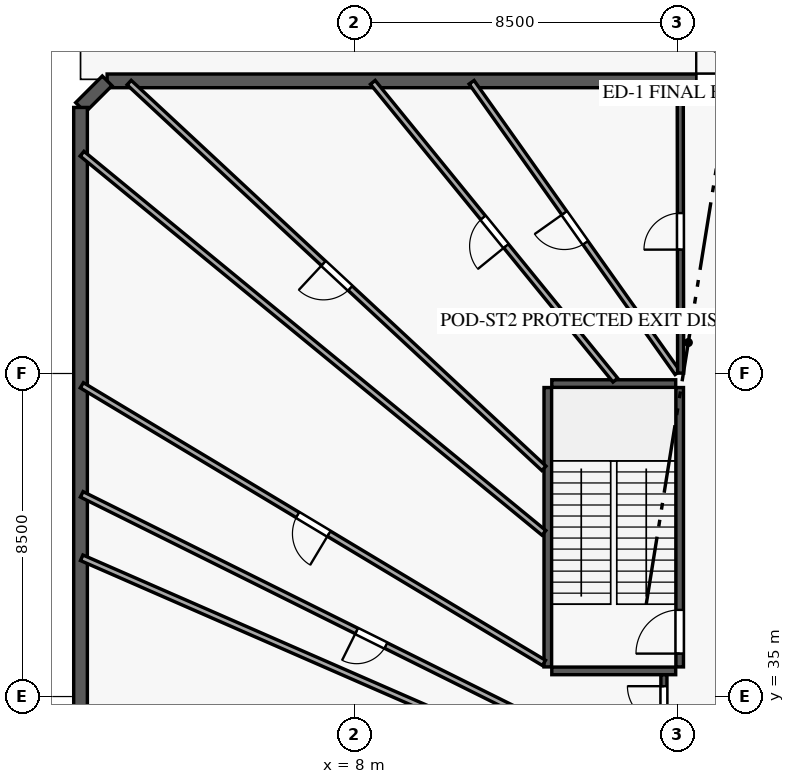
"""IFC4 building model, lengths in metres.
Left out: names, types, materials, properties, quantities, classifications, styles, units other than length and angle.
Written with IfcOpenShell. Run it as: python <this file> out.ifc"""

import sys

from ifc_helpers import new_model, si_unit, direction, frame, frame_2d, origin, origin_with_axes, origin_2d, place, context, subcontext, project, spatial, rectangle, circle, extrude, source, transform, mapped, element, fill, save


model = new_model("IFC4")
c1 = context("Model", 3, precision=1e-05, world=origin(), true_north=direction((0.0, 1.0)))
c2 = subcontext(c1, "Body", "Model", "MODEL_VIEW")
j1 = project(units=[si_unit("LENGTHUNIT", "METRE"), si_unit("PLANEANGLEUNIT", "RADIAN")], contexts=[c1])
p1 = place(None, origin())
s1 = spatial("IfcSite", under=j1, at=p1, CompositionType="ELEMENT")
p2 = place(p1, origin())
s2 = spatial("IfcBuilding", under=s1, at=p2, CompositionType="ELEMENT")
p3 = place(p2, origin())
s3 = spatial("IfcBuildingStorey", under=s2, at=p3, CompositionType="ELEMENT", Elevation=0.0)
m1 = source(origin_with_axes(), c2, "Body", "SweptSolid", [
    extrude(circle(Radius=0.9, at=origin_2d()), origin(), (0.0, 0.0, 1.0), 4.5),
])
p4 = place(p3, frame((10.2, 45.5, 0.0), z_axis=(0.0, 0.0, 1.0), x_axis=(1.0, 0.0, 0.0)))
e1 = element("IfcColumn", 1, at=p4, inside=s3, PredefinedType="COLUMN", context=c2, shape_type="MappedRepresentation", body=[
    mapped(m1, transform((0.0, 0.0, 0.0), scale=1.0)),
])
p5 = place(p3, frame((1.5, 51.2, 0.0), z_axis=(0.0, 0.0, 1.0), x_axis=(1.0, 0.0, 0.0)))
e2 = element("IfcWall", 2, at=p5, inside=s3, PredefinedType="SOLIDWALL", context=c2, shape_type="SweptSolid", body=[
    extrude(rectangle(XDim=54.6, YDim=0.36, at=frame_2d((27.3, 0.0))), origin(), (0.0, 0.0, 1.0), 4.2),
])
p6 = place(p5, frame((51.007, 0.0, 0.85)))
e3 = element("IfcOpeningElement", 3, at=p6, cuts=e2, PredefinedType="OPENING", context=c2, shape_type="SweptSolid", body=[
    extrude(rectangle(XDim=1.8, YDim=2.2, at=frame_2d((0.9, 1.1))), frame((0.0, 0.19, 0.0), z_axis=(0.0, -1.0, 0.0), x_axis=(1.0, 0.0, 0.0)), (0.0, 0.0, 1.0), 0.38),
])
p7 = place(p5, frame((46.765, 0.0, 0.85)))
e4 = element("IfcOpeningElement", 4, at=p7, cuts=e2, PredefinedType="OPENING", context=c2, shape_type="SweptSolid", body=[
    extrude(rectangle(XDim=1.8, YDim=2.2, at=frame_2d((0.9, 1.1))), frame((0.0, 0.19, 0.0), z_axis=(0.0, -1.0, 0.0), x_axis=(1.0, 0.0, 0.0)), (0.0, 0.0, 1.0), 0.38),
])
p8 = place(p5, frame((41.844, 0.0, 0.85)))
e5 = element("IfcOpeningElement", 5, at=p8, cuts=e2, PredefinedType="OPENING", context=c2, shape_type="SweptSolid", body=[
    extrude(rectangle(XDim=1.8, YDim=2.2, at=frame_2d((0.9, 1.1))), frame((0.0, 0.19, 0.0), z_axis=(0.0, -1.0, 0.0), x_axis=(1.0, 0.0, 0.0)), (0.0, 0.0, 1.0), 0.38),
])
p9 = place(p5, frame((36.894, 0.0, 0.85)))
e6 = element("IfcOpeningElement", 6, at=p9, cuts=e2, PredefinedType="OPENING", context=c2, shape_type="SweptSolid", body=[
    extrude(rectangle(XDim=1.8, YDim=2.2, at=frame_2d((0.9, 1.1))), frame((0.0, 0.19, 0.0), z_axis=(0.0, -1.0, 0.0), x_axis=(1.0, 0.0, 0.0)), (0.0, 0.0, 1.0), 0.38),
])
p10 = place(p5, frame((29.542, 0.0, 0.85)))
e7 = element("IfcOpeningElement", 7, at=p10, cuts=e2, PredefinedType="OPENING", context=c2, shape_type="SweptSolid", body=[
    extrude(rectangle(XDim=1.8, YDim=2.2, at=frame_2d((0.9, 1.1))), frame((0.0, 0.19, 0.0), z_axis=(0.0, -1.0, 0.0), x_axis=(1.0, 0.0, 0.0)), (0.0, 0.0, 1.0), 0.38),
])
p11 = place(p5, frame((25.094, 0.0, 0.85)))
e8 = element("IfcOpeningElement", 8, at=p11, cuts=e2, PredefinedType="OPENING", context=c2, shape_type="SweptSolid", body=[
    extrude(rectangle(XDim=1.8, YDim=2.2, at=frame_2d((0.9, 1.1))), frame((0.0, 0.19, 0.0), z_axis=(0.0, -1.0, 0.0), x_axis=(1.0, 0.0, 0.0)), (0.0, 0.0, 1.0), 0.38),
])
p12 = place(p5, frame((11.445, 0.0, 0.85)))
e9 = element("IfcOpeningElement", 9, at=p12, cuts=e2, PredefinedType="OPENING", context=c2, shape_type="SweptSolid", body=[
    extrude(rectangle(XDim=1.8, YDim=2.2, at=frame_2d((0.9, 1.1))), frame((0.0, 0.19, 0.0), z_axis=(0.0, -1.0, 0.0), x_axis=(1.0, 0.0, 0.0)), (0.0, 0.0, 1.0), 0.38),
])
p13 = place(p5, frame((2.908, 0.0, 0.85)))
e10 = element("IfcOpeningElement", 10, at=p13, cuts=e2, PredefinedType="OPENING", context=c2, shape_type="SweptSolid", body=[
    extrude(rectangle(XDim=1.8, YDim=2.2, at=frame_2d((0.9, 1.1))), frame((0.0, 0.19, 0.0), z_axis=(0.0, -1.0, 0.0), x_axis=(1.0, 0.0, 0.0)), (0.0, 0.0, 1.0), 0.38),
])
p14 = place(p5, frame((19.6, 0.0, 0.0)))
e11 = element("IfcOpeningElement", 11, at=p14, cuts=e2, PredefinedType="OPENING", context=c2, shape_type="SweptSolid", body=[
    extrude(rectangle(XDim=1.8, YDim=2.3, at=frame_2d((0.9, 1.15))), frame((0.0, 0.19, 0.0), z_axis=(0.0, -1.0, 0.0), x_axis=(1.0, 0.0, 0.0)), (0.0, 0.0, 1.0), 0.38),
])
p15 = place(p5, frame((22.2, 0.0, 0.0)))
e12 = element("IfcOpeningElement", 12, at=p15, cuts=e2, PredefinedType="OPENING", context=c2, shape_type="SweptSolid", body=[
    extrude(rectangle(XDim=1.8, YDim=2.3, at=frame_2d((0.9, 1.15))), frame((0.0, 0.19, 0.0), z_axis=(0.0, -1.0, 0.0), x_axis=(1.0, 0.0, 0.0)), (0.0, 0.0, 1.0), 0.38),
])
p16 = place(p5, frame((15.5, 0.0, 0.0)))
e13 = element("IfcOpeningElement", 13, at=p16, cuts=e2, PredefinedType="OPENING", context=c2, shape_type="SweptSolid", body=[
    extrude(rectangle(XDim=1.8, YDim=2.3, at=frame_2d((0.9, 1.15))), frame((0.0, 0.19, 0.0), z_axis=(0.0, -1.0, 0.0), x_axis=(1.0, 0.0, 0.0)), (0.0, 0.0, 1.0), 0.38),
])
p17 = place(p3, frame((1.5, 51.2, 0.0), z_axis=(0.0, 0.0, 1.0), x_axis=(-0.707106781187, -0.707106781187, 0.0)))
e14 = element("IfcWall", 14, at=p17, inside=s3, PredefinedType="SOLIDWALL", context=c2, shape_type="SweptSolid", body=[
    extrude(rectangle(XDim=0.99, YDim=0.36, at=frame_2d((0.495, 0.0))), origin(), (0.0, 0.0, 1.0), 4.2),
])
p18 = place(p3, frame((0.8, 2.5, 0.0), z_axis=(0.0, 0.0, 1.0), x_axis=(0.0, 1.0, 0.0)))
e15 = element("IfcWall", 15, at=p18, inside=s3, PredefinedType="SOLIDWALL", context=c2, shape_type="SweptSolid", body=[
    extrude(rectangle(XDim=48.0, YDim=0.36, at=frame_2d((24.0, 0.0))), origin(), (0.0, 0.0, 1.0), 4.2),
])
p19 = place(p18, frame((42.816, 0.0, 0.85)))
e16 = element("IfcOpeningElement", 16, at=p19, cuts=e15, PredefinedType="OPENING", context=c2, shape_type="SweptSolid", body=[
    extrude(rectangle(XDim=1.8, YDim=2.2, at=frame_2d((0.9, 1.1))), frame((0.0, 0.19, 0.0), z_axis=(0.0, -1.0, 0.0), x_axis=(1.0, 0.0, 0.0)), (0.0, 0.0, 1.0), 0.38),
])
p20 = place(p18, frame((38.338, 0.0, 0.85)))
e17 = element("IfcOpeningElement", 17, at=p20, cuts=e15, PredefinedType="OPENING", context=c2, shape_type="SweptSolid", body=[
    extrude(rectangle(XDim=1.8, YDim=2.2, at=frame_2d((0.9, 1.1))), frame((0.0, 0.19, 0.0), z_axis=(0.0, -1.0, 0.0), x_axis=(1.0, 0.0, 0.0)), (0.0, 0.0, 1.0), 0.38),
])
p21 = place(p18, frame((33.194, 0.0, 0.85)))
e18 = element("IfcOpeningElement", 18, at=p21, cuts=e15, PredefinedType="OPENING", context=c2, shape_type="SweptSolid", body=[
    extrude(rectangle(XDim=1.8, YDim=2.2, at=frame_2d((0.9, 1.1))), frame((0.0, 0.19, 0.0), z_axis=(0.0, -1.0, 0.0), x_axis=(1.0, 0.0, 0.0)), (0.0, 0.0, 1.0), 0.38),
])
p22 = place(p18, frame((29.492, 0.0, 0.85)))
e19 = element("IfcOpeningElement", 19, at=p22, cuts=e15, PredefinedType="OPENING", context=c2, shape_type="SweptSolid", body=[
    extrude(rectangle(XDim=1.8, YDim=2.2, at=frame_2d((0.9, 1.1))), frame((0.0, 0.19, 0.0), z_axis=(0.0, -1.0, 0.0), x_axis=(1.0, 0.0, 0.0)), (0.0, 0.0, 1.0), 0.38),
])
p23 = place(p18, frame((24.971, 0.0, 0.85)))
e20 = element("IfcOpeningElement", 20, at=p23, cuts=e15, PredefinedType="OPENING", context=c2, shape_type="SweptSolid", body=[
    extrude(rectangle(XDim=1.8, YDim=2.2, at=frame_2d((0.9, 1.1))), frame((0.0, 0.19, 0.0), z_axis=(0.0, -1.0, 0.0), x_axis=(1.0, 0.0, 0.0)), (0.0, 0.0, 1.0), 0.38),
])
p24 = place(p18, frame((12.315, 0.0, 0.85)))
e21 = element("IfcOpeningElement", 21, at=p24, cuts=e15, PredefinedType="OPENING", context=c2, shape_type="SweptSolid", body=[
    extrude(rectangle(XDim=1.8, YDim=2.2, at=frame_2d((0.9, 1.1))), frame((0.0, 0.19, 0.0), z_axis=(0.0, -1.0, 0.0), x_axis=(1.0, 0.0, 0.0)), (0.0, 0.0, 1.0), 0.38),
])
p25 = place(p18, frame((6.841, 0.0, 0.85)))
e22 = element("IfcOpeningElement", 22, at=p25, cuts=e15, PredefinedType="OPENING", context=c2, shape_type="SweptSolid", body=[
    extrude(rectangle(XDim=1.8, YDim=2.2, at=frame_2d((0.9, 1.1))), frame((0.0, 0.19, 0.0), z_axis=(0.0, -1.0, 0.0), x_axis=(1.0, 0.0, 0.0)), (0.0, 0.0, 1.0), 0.38),
])
p26 = place(p18, frame((3.189, 0.0, 0.85)))
e23 = element("IfcOpeningElement", 23, at=p26, cuts=e15, PredefinedType="OPENING", context=c2, shape_type="SweptSolid", body=[
    extrude(rectangle(XDim=1.8, YDim=2.2, at=frame_2d((0.9, 1.1))), frame((0.0, 0.19, 0.0), z_axis=(0.0, -1.0, 0.0), x_axis=(1.0, 0.0, 0.0)), (0.0, 0.0, 1.0), 0.38),
])
p27 = place(p18, frame((17.2, 0.0, 0.0)))
e24 = element("IfcOpeningElement", 24, at=p27, cuts=e15, PredefinedType="OPENING", context=c2, shape_type="SweptSolid", body=[
    extrude(rectangle(XDim=1.8, YDim=2.3, at=frame_2d((0.9, 1.15))), frame((0.0, 0.19, 0.0), z_axis=(0.0, -1.0, 0.0), x_axis=(1.0, 0.0, 0.0)), (0.0, 0.0, 1.0), 0.38),
])
p28 = place(p3, frame((13.095, 35.78, 0.0), z_axis=(0.0, 0.0, 1.0), x_axis=(0.0, 1.0, 0.0)))
e25 = element("IfcWall", 25, at=p28, inside=s3, PredefinedType="SHEAR", context=c2, shape_type="SweptSolid", body=[
    extrude(rectangle(XDim=7.35, YDim=0.2, at=frame_2d((3.675, 0.0))), origin(), (0.0, 0.0, 1.0), 4.2),
])
p29 = place(p3, frame((16.565, 35.78, 0.0), z_axis=(0.0, 0.0, 1.0), x_axis=(0.0, 1.0, 0.0)))
e26 = element("IfcWall", 26, at=p29, inside=s3, PredefinedType="SHEAR", context=c2, shape_type="SweptSolid", body=[
    extrude(rectangle(XDim=7.35, YDim=0.2, at=frame_2d((3.675, 0.0))), origin(), (0.0, 0.0, 1.0), 4.2),
])
p30 = place(p29, frame((0.35, 0.0, 0.0)))
e27 = element("IfcOpeningElement", 27, at=p30, cuts=e26, PredefinedType="OPENING", context=c2, shape_type="SweptSolid", body=[
    extrude(rectangle(XDim=1.15, YDim=2.15, at=frame_2d((0.575, 1.075))), frame((0.0, 0.11, 0.0), z_axis=(0.0, -1.0, 0.0), x_axis=(1.0, 0.0, 0.0)), (0.0, 0.0, 1.0), 0.22),
])
for number, where, z_axis, x_axis in (
    (28, (13.2, 35.675, 0.0), (0.0, 0.0, 1.0), (1.0, 0.0, 0.0)),
    (29, (13.2, 43.235, 0.0), (0.0, 0.0, 1.0), (1.0, 0.0, 0.0)),
):
    element("IfcWall", number, at=place(p3, frame(where, z_axis=z_axis, x_axis=x_axis)), inside=s3, PredefinedType="SHEAR", context=c2, shape_type="SweptSolid", body=[
        extrude(rectangle(XDim=3.26, YDim=0.2, at=frame_2d((1.63, 0.0))), origin(), (0.0, 0.0, 1.0), 4.2),
    ])
p31 = place(p3, frame((16.068, 32.747, 0.0), z_axis=(0.0, 0.0, 1.0), x_axis=(-0.895480769827, 0.44510020318, 0.0)))
e30 = element("IfcWall", 30, at=p31, inside=s3, PredefinedType="PARTITIONING", context=c2, shape_type="SweptSolid", body=[
    extrude(rectangle(XDim=17.015, YDim=0.16, at=frame_2d((8.507, 0.0))), origin(), (0.0, 0.0, 1.0), 4.2),
])
p32 = place(p31, frame((8.077, 0.0, 0.0)))
e31 = element("IfcOpeningElement", 31, at=p32, cuts=e30, PredefinedType="OPENING", context=c2, shape_type="SweptSolid", body=[
    extrude(rectangle(XDim=0.86, YDim=2.04, at=frame_2d((0.43, 1.02))), frame((0.0, 0.09, 0.0), z_axis=(0.0, -1.0, 0.0), x_axis=(1.0, 0.0, 0.0)), (0.0, 0.0, 1.0), 0.18),
])
p33 = place(p3, frame((16.068, 31.996, 0.0), z_axis=(0.0, 0.0, 1.0), x_axis=(-0.916400464202, 0.400262650281, 0.0)))
e32 = element("IfcWall", 32, at=p33, inside=s3, PredefinedType="PARTITIONING", context=c2, shape_type="SweptSolid", body=[
    extrude(rectangle(XDim=16.628, YDim=0.16, at=frame_2d((8.314, 0.0))), origin(), (0.0, 0.0, 1.0), 4.2),
])
p34 = place(p3, frame((12.993, 39.307, 0.0), z_axis=(0.0, 0.0, 1.0), x_axis=(-0.772944890545, 0.634473164272, 0.0)))
e33 = element("IfcWall", 33, at=p34, inside=s3, PredefinedType="PARTITIONING", context=c2, shape_type="SweptSolid", body=[
    extrude(rectangle(XDim=15.723, YDim=0.16, at=frame_2d((7.862, 0.0))), origin(), (0.0, 0.0, 1.0), 4.2),
])
p35 = place(p3, frame((12.993, 41.004, 0.0), z_axis=(0.0, 0.0, 1.0), x_axis=(-0.732268799171, 0.681015716236, 0.0)))
e34 = element("IfcWall", 34, at=p35, inside=s3, PredefinedType="PARTITIONING", context=c2, shape_type="SweptSolid", body=[
    extrude(rectangle(XDim=14.905, YDim=0.16, at=frame_2d((7.452, 0.0))), origin(), (0.0, 0.0, 1.0), 4.2),
])
p36 = place(p35, frame((6.96, 0.0, 0.0)))
e35 = element("IfcOpeningElement", 35, at=p36, cuts=e34, PredefinedType="OPENING", context=c2, shape_type="SweptSolid", body=[
    extrude(rectangle(XDim=0.96, YDim=2.15, at=frame_2d((0.48, 1.075))), frame((0.0, 0.09, 0.0), z_axis=(0.0, -1.0, 0.0), x_axis=(1.0, 0.0, 0.0)), (0.0, 0.0, 1.0), 0.18),
])
p37 = place(p3, frame((12.993, 35.885, 0.0), z_axis=(0.0, 0.0, 1.0), x_axis=(-0.857213350392, 0.514961427594, 0.0)))
e36 = element("IfcWall", 36, at=p37, inside=s3, PredefinedType="PARTITIONING", context=c2, shape_type="SweptSolid", body=[
    extrude(rectangle(XDim=14.184, YDim=0.16, at=frame_2d((7.092, 0.0))), origin(), (0.0, 0.0, 1.0), 4.2),
])
p38 = place(p37, frame((6.6, 0.0, 0.0)))
e37 = element("IfcOpeningElement", 37, at=p38, cuts=e36, PredefinedType="OPENING", context=c2, shape_type="SweptSolid", body=[
    extrude(rectangle(XDim=0.96, YDim=2.15, at=frame_2d((0.48, 1.075))), frame((0.0, 0.09, 0.0), z_axis=(0.0, -1.0, 0.0), x_axis=(1.0, 0.0, 0.0)), (0.0, 0.0, 1.0), 0.18),
])
p39 = place(p3, frame((14.872, 43.325, 0.0), z_axis=(0.0, 0.0, 1.0), x_axis=(-0.63154172537, 0.775341891759, 0.0)))
e38 = element("IfcWall", 38, at=p39, inside=s3, PredefinedType="PARTITIONING", context=c2, shape_type="SweptSolid", body=[
    extrude(rectangle(XDim=10.105, YDim=0.16, at=frame_2d((5.053, 0.0))), origin(), (0.0, 0.0, 1.0), 4.2),
])
p40 = place(p39, frame((4.552, 0.0, 0.0)))
e39 = element("IfcOpeningElement", 39, at=p40, cuts=e38, PredefinedType="OPENING", context=c2, shape_type="SweptSolid", body=[
    extrude(rectangle(XDim=0.96, YDim=2.15, at=frame_2d((0.48, 1.075))), frame((0.0, 0.09, 0.0), z_axis=(0.0, -1.0, 0.0), x_axis=(1.0, 0.0, 0.0)), (0.0, 0.0, 1.0), 0.18),
])
p41 = place(p3, frame((16.51, 43.518, 0.0), z_axis=(0.0, 0.0, 1.0), x_axis=(-0.578309317505, 0.815817585792, 0.0)))
e40 = element("IfcWall", 40, at=p41, inside=s3, PredefinedType="PARTITIONING", context=c2, shape_type="SweptSolid", body=[
    extrude(rectangle(XDim=9.372, YDim=0.16, at=frame_2d((4.686, 0.0))), origin(), (0.0, 0.0, 1.0), 4.2),
])
p42 = place(p41, frame((4.193, 0.0, 0.0)))
e41 = element("IfcOpeningElement", 41, at=p42, cuts=e40, PredefinedType="OPENING", context=c2, shape_type="SweptSolid", body=[
    extrude(rectangle(XDim=0.96, YDim=2.15, at=frame_2d((0.48, 1.075))), frame((0.0, 0.09, 0.0), z_axis=(0.0, -1.0, 0.0), x_axis=(1.0, 0.0, 0.0)), (0.0, 0.0, 1.0), 0.18),
])
p43 = place(p3, frame((16.59, 43.51, 0.0), z_axis=(0.0, 0.0, 1.0), x_axis=(-0.001297773224, 0.999999157892, 0.0)))
e42 = element("IfcWall", 42, at=p43, inside=s3, PredefinedType="PARTITIONING", context=c2, shape_type="SweptSolid", body=[
    extrude(rectangle(XDim=7.525, YDim=0.16, at=frame_2d((3.762, 0.0))), origin(), (0.0, 0.0, 1.0), 4.2),
])
p44 = place(p43, frame((3.25, 0.0, 0.0)))
e43 = element("IfcOpeningElement", 43, at=p44, cuts=e42, PredefinedType="OPENING", context=c2, shape_type="SweptSolid", body=[
    extrude(rectangle(XDim=0.96, YDim=2.15, at=frame_2d((0.48, 1.075))), frame((0.0, 0.09, 0.0), z_axis=(0.0, -1.0, 0.0), x_axis=(1.0, 0.0, 0.0)), (0.0, 0.0, 1.0), 0.18),
])
p45 = place(p3, frame((16.15, 29.712, 0.0), z_axis=(0.0, 0.0, 1.0), x_axis=(0.0, 1.0, 0.0)))
e44 = element("IfcWall", 44, at=p45, inside=s3, PredefinedType="PARTITIONING", context=c2, shape_type="SweptSolid", body=[
    extrude(rectangle(XDim=5.861, YDim=0.16, at=frame_2d((2.93, 0.0))), origin(), (0.0, 0.0, 1.0), 4.2),
])
p46 = place(p45, frame((3.459, 0.0, 0.0)))
e45 = element("IfcOpeningElement", 45, at=p46, cuts=e44, PredefinedType="OPENING", context=c2, shape_type="SweptSolid", body=[
    extrude(rectangle(XDim=0.96, YDim=2.15, at=frame_2d((0.48, 1.075))), frame((0.0, 0.09, 0.0), z_axis=(0.0, -1.0, 0.0), x_axis=(1.0, 0.0, 0.0)), (0.0, 0.0, 1.0), 0.18),
])
p47 = place(p45, frame((1.1, 0.0, 0.0)))
e46 = element("IfcOpeningElement", 46, at=p47, cuts=e44, PredefinedType="OPENING", context=c2, shape_type="SweptSolid", body=[
    extrude(rectangle(XDim=0.96, YDim=2.15, at=frame_2d((0.48, 1.075))), frame((0.0, 0.09, 0.0), z_axis=(0.0, -1.0, 0.0), x_axis=(1.0, 0.0, 0.0)), (0.0, 0.0, 1.0), 0.18),
])
p48 = place(p45, frame((4.601, 0.0, 0.0)))
e47 = element("IfcOpeningElement", 47, at=p48, cuts=e44, PredefinedType="OPENING", context=c2, shape_type="SweptSolid", body=[
    extrude(rectangle(XDim=0.96, YDim=2.15, at=frame_2d((0.48, 1.075))), frame((0.0, 0.09, 0.0), z_axis=(0.0, -1.0, 0.0), x_axis=(1.0, 0.0, 0.0)), (0.0, 0.0, 1.0), 0.18),
])
m2 = source(origin_with_axes(), c2, "Body", "SweptSolid", [
    extrude(rectangle(XDim=1.8, YDim=2.2, at=frame_2d((0.9, 1.1))), frame((0.0, 0.03, 0.0), z_axis=(0.0, -1.0, 0.0), x_axis=(1.0, 0.0, 0.0)), (0.0, 0.0, 1.0), 0.06),
])
p49 = place(p12, origin())
e48 = element("IfcWindow", 48, at=p49, inside=s3, PartitioningType="SINGLE_PANEL", PredefinedType="WINDOW", context=c2, shape_type="MappedRepresentation", body=[
    mapped(m2, transform((0.0, 0.0, 0.0), scale=1.0)),
])
fill(e9, e48)
p50 = place(p13, origin())
e49 = element("IfcWindow", 49, at=p50, inside=s3, PartitioningType="SINGLE_PANEL", PredefinedType="WINDOW", context=c2, shape_type="MappedRepresentation", body=[
    mapped(m2, transform((0.0, 0.0, 0.0), scale=1.0)),
])
fill(e10, e49)
p51 = place(p19, origin())
e50 = element("IfcWindow", 50, at=p51, inside=s3, PartitioningType="SINGLE_PANEL", PredefinedType="WINDOW", context=c2, shape_type="MappedRepresentation", body=[
    mapped(m2, transform((0.0, 0.0, 0.0), scale=1.0)),
])
fill(e16, e50)
p52 = place(p20, origin())
e51 = element("IfcWindow", 51, at=p52, inside=s3, PartitioningType="SINGLE_PANEL", PredefinedType="WINDOW", context=c2, shape_type="MappedRepresentation", body=[
    mapped(m2, transform((0.0, 0.0, 0.0), scale=1.0)),
])
fill(e17, e51)
p53 = place(p21, origin())
e52 = element("IfcWindow", 52, at=p53, inside=s3, PartitioningType="SINGLE_PANEL", PredefinedType="WINDOW", context=c2, shape_type="MappedRepresentation", body=[
    mapped(m2, transform((0.0, 0.0, 0.0), scale=1.0)),
])
fill(e18, e52)
m3 = source(origin_with_axes(), c2, "Body", "SweptSolid", [
    extrude(rectangle(XDim=1.8, YDim=2.3, at=frame_2d((0.9, 1.15))), frame((0.0, 0.025, 0.0), z_axis=(0.0, -1.0, 0.0), x_axis=(1.0, 0.0, 0.0)), (0.0, 0.0, 1.0), 0.05),
])
p54 = place(p16, origin())
e53 = element("IfcDoor", 53, at=p54, inside=s3, OperationType="DOUBLE_DOOR_SINGLE_SWING", PredefinedType="DOOR", context=c2, shape_type="MappedRepresentation", body=[
    mapped(m3, transform((0.0, 0.0, 0.0), scale=1.0)),
])
fill(e13, e53)
m4 = source(origin_with_axes(), c2, "Body", "SweptSolid", [
    extrude(rectangle(XDim=1.15, YDim=2.15, at=frame_2d((0.575, 1.075))), frame((0.0, 0.025, 0.0), z_axis=(0.0, -1.0, 0.0), x_axis=(1.0, 0.0, 0.0)), (0.0, 0.0, 1.0), 0.05),
])
p55 = place(p30, origin())
e54 = element("IfcDoor", 54, at=p55, inside=s3, OperationType="SINGLE_SWING_LEFT", PredefinedType="DOOR", context=c2, shape_type="MappedRepresentation", body=[
    mapped(m4, transform((0.0, 0.0, 0.0), scale=1.0)),
])
fill(e27, e54)
m5 = source(origin_with_axes(), c2, "Body", "SweptSolid", [
    extrude(rectangle(XDim=0.96, YDim=2.15, at=frame_2d((0.48, 1.075))), frame((0.0, 0.025, 0.0), z_axis=(0.0, -1.0, 0.0), x_axis=(1.0, 0.0, 0.0)), (0.0, 0.0, 1.0), 0.05),
])
p56 = place(p44, origin())
e55 = element("IfcDoor", 55, at=p56, inside=s3, OperationType="SINGLE_SWING_LEFT", PredefinedType="DOOR", context=c2, shape_type="MappedRepresentation", body=[
    mapped(m5, transform((0.0, 0.0, 0.0), scale=1.0)),
])
fill(e43, e55)
p57 = place(p42, origin())
e56 = element("IfcDoor", 56, at=p57, inside=s3, OperationType="SINGLE_SWING_RIGHT", PredefinedType="DOOR", context=c2, shape_type="MappedRepresentation", body=[
    mapped(m5, transform((0.0, 0.0, 0.0), scale=1.0)),
])
fill(e41, e56)
p58 = place(p40, origin())
e57 = element("IfcDoor", 57, at=p58, inside=s3, OperationType="SINGLE_SWING_LEFT", PredefinedType="DOOR", context=c2, shape_type="MappedRepresentation", body=[
    mapped(m5, transform((0.0, 0.0, 0.0), scale=1.0)),
])
fill(e39, e57)
p59 = place(p36, origin())
e58 = element("IfcDoor", 58, at=p59, inside=s3, OperationType="SINGLE_SWING_RIGHT", PredefinedType="DOOR", context=c2, shape_type="MappedRepresentation", body=[
    mapped(m5, transform((0.0, 0.0, 0.0), scale=1.0)),
])
fill(e35, e58)
p60 = place(p38, origin())
e59 = element("IfcDoor", 59, at=p60, inside=s3, OperationType="SINGLE_SWING_LEFT", PredefinedType="DOOR", context=c2, shape_type="MappedRepresentation", body=[
    mapped(m5, transform((0.0, 0.0, 0.0), scale=1.0)),
])
fill(e37, e59)
p61 = place(p48, origin())
e60 = element("IfcDoor", 60, at=p61, inside=s3, OperationType="SINGLE_SWING_RIGHT", PredefinedType="DOOR", context=c2, shape_type="MappedRepresentation", body=[
    mapped(m5, transform((0.0, 0.0, 0.0), scale=1.0)),
])
fill(e47, e60)
m6 = source(origin_with_axes(), c2, "Body", "SweptSolid", [
    extrude(rectangle(XDim=0.86, YDim=2.04, at=frame_2d((0.43, 1.02))), frame((0.0, 0.025, 0.0), z_axis=(0.0, -1.0, 0.0), x_axis=(1.0, 0.0, 0.0)), (0.0, 0.0, 1.0), 0.05),
])
p62 = place(p32, origin())
e61 = element("IfcDoor", 61, at=p62, inside=s3, OperationType="SINGLE_SWING_RIGHT", PredefinedType="DOOR", context=c2, shape_type="MappedRepresentation", body=[
    mapped(m6, transform((0.0, 0.0, 0.0), scale=1.0)),
])
fill(e31, e61)
save(model, sys.argv[1])
